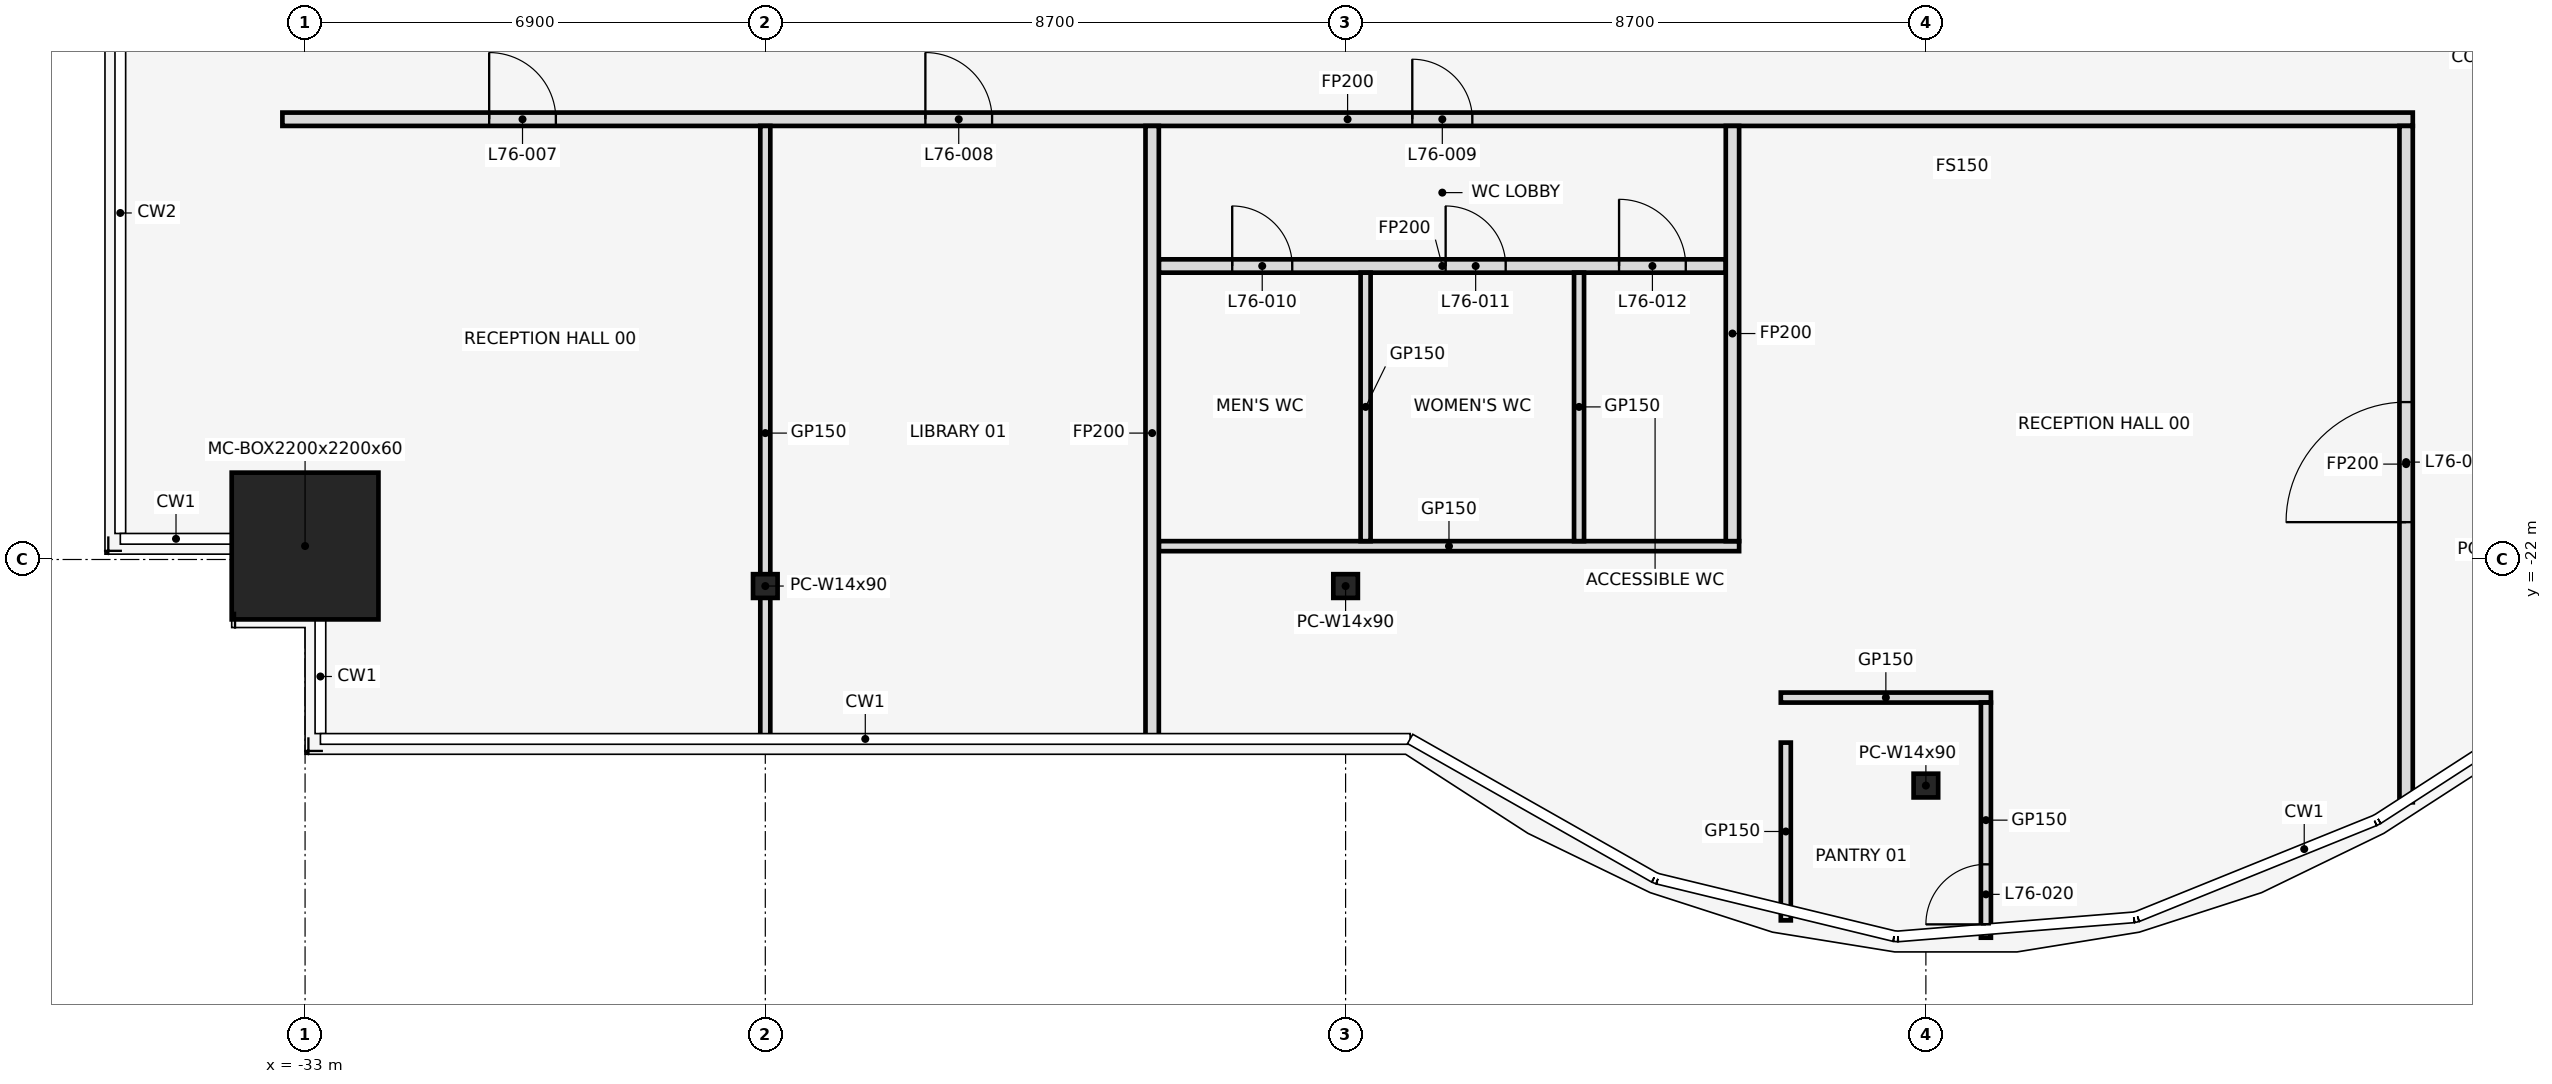
"""IFC4 building model, lengths in metres.
Left out: names, types, materials, properties, quantities, classifications, styles, units other than length and angle.
Written with IfcOpenShell. Run it as: python <this file> out.ifc"""

import sys

from ifc_helpers import new_model, si_unit, direction, frame, frame_2d, origin, origin_2d, place, context, subcontext, project, spatial, rectangle, hollow_rectangle, i_section, extrude, element, fill, save


model = new_model("IFC4")
c1 = context("Model", 3, precision=1e-05, world=origin(), true_north=direction((0.0, 1.0)))
c2 = subcontext(c1, "Body", "Model", "MODEL_VIEW")
j1 = project(units=[si_unit("LENGTHUNIT", "METRE"), si_unit("PLANEANGLEUNIT", "RADIAN")], contexts=[c1])
p1 = place(None, origin())
s1 = spatial("IfcSite", under=j1, at=p1, CompositionType="ELEMENT")
p2 = place(p1, origin())
s2 = spatial("IfcBuilding", under=s1, at=p2, CompositionType="ELEMENT")
p3 = place(p2, frame((0.0, 0.0, 338.0)))
s3 = spatial("IfcBuildingStorey", under=s2, at=p3, CompositionType="ELEMENT", Elevation=338.0)
p4 = place(p3, frame((-33.0, -21.798, 0.0), z_axis=(0.0, 0.0, 1.0), x_axis=(1.0, 0.0, 0.0)))
e1 = element("IfcColumn", 1, at=p4, inside=s3, PredefinedType="COLUMN", context=c2, shape_type="SweptSolid", body=[
    extrude(hollow_rectangle(XDim=2.2, YDim=2.2, WallThickness=0.06, at=origin_2d()), origin(), (0.0, 0.0, 1.0), 4.5),
])
for number, where, z_axis, x_axis in (
    (2, (-26.1, -22.398, 0.0), (0.0, 0.0, 1.0), (1.0, 0.0, 0.0)),
    (3, (-17.4, -22.398, 0.0), (0.0, 0.0, 1.0), (1.0, 0.0, 0.0)),
    (4, (-8.7, -25.389, 0.0), (0.0, 0.0, 1.0), (1.0, 0.0, 0.0)),
):
    element("IfcColumn", number, at=place(p3, frame(where, z_axis=z_axis, x_axis=x_axis)), inside=s3, PredefinedType="COLUMN", context=c2, shape_type="SweptSolid", body=[
        extrude(i_section(OverallWidth=0.368, OverallDepth=0.356, WebThickness=0.011, FlangeThickness=0.018, at=origin_2d()), origin(), (0.0, 0.0, 1.0), 4.5),
    ])
p5 = place(p3, frame((-10.875, -24.07, 0.0), z_axis=(0.0, 0.0, 1.0), x_axis=(1.0, 0.0, 0.0)))
e5 = element("IfcWall", 5, at=p5, inside=s3, PredefinedType="PARTITIONING", context=c2, shape_type="SweptSolid", body=[
    extrude(rectangle(XDim=3.15, YDim=0.15, at=frame_2d((1.575, 0.0))), origin(), (0.0, 0.0, 1.0), 3.368),
])
p6 = place(p3, frame((-20.2, -21.8, 0.0), z_axis=(0.0, 0.0, 1.0), x_axis=(1.0, 0.0, 0.0)))
e6 = element("IfcWall", 6, at=p6, inside=s3, PredefinedType="PARTITIONING", context=c2, shape_type="SweptSolid", body=[
    extrude(rectangle(XDim=8.7, YDim=0.15, at=frame_2d((4.35, 0.0))), origin(), (0.0, 0.0, 1.0), 3.368),
])
p7 = place(p3, frame((-20.2, -17.6, 0.0), z_axis=(0.0, 0.0, 1.0), x_axis=(1.0, 0.0, 0.0)))
e7 = element("IfcWall", 7, at=p7, inside=s3, PredefinedType="PARTITIONING", context=c2, shape_type="SweptSolid", body=[
    extrude(rectangle(XDim=8.5, YDim=0.2, at=frame_2d((4.25, 0.0))), origin(), (0.0, 0.0, 1.0), 3.368),
])
p8 = place(p7, frame((1.1, 0.0, 0.0)))
e8 = element("IfcOpeningElement", 8, at=p8, cuts=e7, PredefinedType="OPENING", context=c2, shape_type="SweptSolid", body=[
    extrude(rectangle(XDim=0.9, YDim=2.1, at=frame_2d((0.45, 1.05))), frame((0.0, 0.112, 0.0), z_axis=(0.0, -1.0, 0.0), x_axis=(1.0, 0.0, 0.0)), (0.0, 0.0, 1.0), 0.224),
])
p9 = place(p7, frame((4.3, 0.0, 0.0)))
e9 = element("IfcOpeningElement", 9, at=p9, cuts=e7, PredefinedType="OPENING", context=c2, shape_type="SweptSolid", body=[
    extrude(rectangle(XDim=0.9, YDim=2.1, at=frame_2d((0.45, 1.05))), frame((0.0, 0.112, 0.0), z_axis=(0.0, -1.0, 0.0), x_axis=(1.0, 0.0, 0.0)), (0.0, 0.0, 1.0), 0.224),
])
p10 = place(p7, frame((6.9, 0.0, 0.0)))
e10 = element("IfcOpeningElement", 10, at=p10, cuts=e7, PredefinedType="OPENING", context=c2, shape_type="SweptSolid", body=[
    extrude(rectangle(XDim=1.0, YDim=2.1, at=frame_2d((0.5, 1.05))), frame((0.0, 0.112, 0.0), z_axis=(0.0, -1.0, 0.0), x_axis=(1.0, 0.0, 0.0)), (0.0, 0.0, 1.0), 0.224),
])
p11 = place(p3, frame((-33.34, -15.4, 0.0), z_axis=(0.0, 0.0, 1.0), x_axis=(1.0, 0.0, 0.0)))
e11 = element("IfcWall", 11, at=p11, inside=s3, PredefinedType="PARTITIONING", context=c2, shape_type="SweptSolid", body=[
    extrude(rectangle(XDim=31.94, YDim=0.2, at=frame_2d((15.97, 0.0))), origin(), (0.0, 0.0, 1.0), 3.368),
])
p12 = place(p11, frame((3.1, 0.0, 0.0)))
e12 = element("IfcOpeningElement", 12, at=p12, cuts=e11, PredefinedType="OPENING", context=c2, shape_type="SweptSolid", body=[
    extrude(rectangle(XDim=1.0, YDim=2.1, at=frame_2d((0.5, 1.05))), frame((0.0, 0.112, 0.0), z_axis=(0.0, -1.0, 0.0), x_axis=(1.0, 0.0, 0.0)), (0.0, 0.0, 1.0), 0.224),
])
p13 = place(p11, frame((9.64, 0.0, 0.0)))
e13 = element("IfcOpeningElement", 13, at=p13, cuts=e11, PredefinedType="OPENING", context=c2, shape_type="SweptSolid", body=[
    extrude(rectangle(XDim=1.0, YDim=2.1, at=frame_2d((0.5, 1.05))), frame((0.0, 0.112, 0.0), z_axis=(0.0, -1.0, 0.0), x_axis=(1.0, 0.0, 0.0)), (0.0, 0.0, 1.0), 0.224),
])
p14 = place(p11, frame((16.94, 0.0, 0.0)))
e14 = element("IfcOpeningElement", 14, at=p14, cuts=e11, PredefinedType="OPENING", context=c2, shape_type="SweptSolid", body=[
    extrude(rectangle(XDim=0.9, YDim=2.1, at=frame_2d((0.45, 1.05))), frame((0.0, 0.112, 0.0), z_axis=(0.0, -1.0, 0.0), x_axis=(1.0, 0.0, 0.0)), (0.0, 0.0, 1.0), 0.224),
])
p15 = place(p3, frame((-26.1, -24.71, 0.0), z_axis=(0.0, 0.0, 1.0), x_axis=(0.0, 1.0, 0.0)))
e15 = element("IfcWall", 15, at=p15, inside=s3, PredefinedType="PARTITIONING", context=c2, shape_type="SweptSolid", body=[
    extrude(rectangle(XDim=9.21, YDim=0.15, at=frame_2d((4.605, 0.0))), origin(), (0.0, 0.0, 1.0), 3.368),
])
p16 = place(p3, frame((-20.3, -24.71, 0.0), z_axis=(0.0, 0.0, 1.0), x_axis=(0.0, 1.0, 0.0)))
e16 = element("IfcWall", 16, at=p16, inside=s3, PredefinedType="PARTITIONING", context=c2, shape_type="SweptSolid", body=[
    extrude(rectangle(XDim=9.21, YDim=0.2, at=frame_2d((4.605, 0.0))), origin(), (0.0, 0.0, 1.0), 3.368),
])
for number, where, z_axis, x_axis in (
    (17, (-17.1, -21.725, 0.0), (0.0, 0.0, 1.0), (0.0, 1.0, 0.0)),
    (18, (-13.9, -21.725, 0.0), (0.0, 0.0, 1.0), (0.0, 1.0, 0.0)),
):
    element("IfcWall", number, at=place(p3, frame(where, z_axis=z_axis, x_axis=x_axis)), inside=s3, PredefinedType="PARTITIONING", context=c2, shape_type="SweptSolid", body=[
        extrude(rectangle(XDim=4.025, YDim=0.15, at=frame_2d((2.013, 0.0))), origin(), (0.0, 0.0, 1.0), 3.368),
    ])
p17 = place(p3, frame((-11.6, -21.725, 0.0), z_axis=(0.0, 0.0, 1.0), x_axis=(0.0, 1.0, 0.0)))
e19 = element("IfcWall", 19, at=p17, inside=s3, PredefinedType="PARTITIONING", context=c2, shape_type="SweptSolid", body=[
    extrude(rectangle(XDim=6.225, YDim=0.2, at=frame_2d((3.113, 0.0))), origin(), (0.0, 0.0, 1.0), 3.368),
])
p18 = place(p3, frame((-10.8, -27.41, 0.0), z_axis=(0.0, 0.0, 1.0), x_axis=(0.0, 1.0, 0.0)))
e20 = element("IfcWall", 20, at=p18, inside=s3, PredefinedType="PARTITIONING", context=c2, shape_type="SweptSolid", body=[
    extrude(rectangle(XDim=2.665, YDim=0.15, at=frame_2d((1.333, 0.0))), origin(), (0.0, 0.0, 1.0), 3.368),
])
p19 = place(p3, frame((-7.8, -27.67, 0.0), z_axis=(0.0, 0.0, 1.0), x_axis=(0.0, 1.0, 0.0)))
e21 = element("IfcWall", 21, at=p19, inside=s3, PredefinedType="PARTITIONING", context=c2, shape_type="SweptSolid", body=[
    extrude(rectangle(XDim=3.525, YDim=0.15, at=frame_2d((1.762, 0.0))), origin(), (0.0, 0.0, 1.0), 3.368),
])
p20 = place(p19, frame((0.2, 0.0, 0.0)))
e22 = element("IfcOpeningElement", 22, at=p20, cuts=e21, PredefinedType="OPENING", context=c2, shape_type="SweptSolid", body=[
    extrude(rectangle(XDim=0.9, YDim=2.1, at=frame_2d((0.45, 1.05))), frame((0.0, 0.087, 0.0), z_axis=(0.0, -1.0, 0.0), x_axis=(1.0, 0.0, 0.0)), (0.0, 0.0, 1.0), 0.174),
])
p21 = place(p3, frame((-1.5, -25.64, 0.0), z_axis=(0.0, 0.0, 1.0), x_axis=(0.0, 1.0, 0.0)))
e23 = element("IfcWall", 23, at=p21, inside=s3, PredefinedType="PARTITIONING", context=c2, shape_type="SweptSolid", body=[
    extrude(rectangle(XDim=10.14, YDim=0.2, at=frame_2d((5.07, 0.0))), origin(), (0.0, 0.0, 1.0), 3.368),
])
p22 = place(p21, frame((4.2, 0.0, 0.0)))
e24 = element("IfcOpeningElement", 24, at=p22, cuts=e23, PredefinedType="OPENING", context=c2, shape_type="SweptSolid", body=[
    extrude(rectangle(XDim=1.8, YDim=2.1, at=frame_2d((0.9, 1.05))), frame((0.0, 0.112, 0.0), z_axis=(0.0, -1.0, 0.0), x_axis=(1.0, 0.0, 0.0)), (0.0, 0.0, 1.0), 0.224),
])
p23 = place(p12, frame((1.0, 0.0, 0.0), z_axis=(0.0, 0.0, 1.0), x_axis=(-1.0, 0.0, 0.0)))
e25 = element("IfcDoor", 25, at=p23, inside=s3, OperationType="SINGLE_SWING_LEFT", PredefinedType="DOOR", context=c2, shape_type="SweptSolid", body=[
    extrude(rectangle(XDim=1.0, YDim=2.1, at=frame_2d((0.5, 1.05))), frame((0.0, 0.025, 0.0), z_axis=(0.0, -1.0, 0.0), x_axis=(1.0, 0.0, 0.0)), (0.0, 0.0, 1.0), 0.05),
])
fill(e12, e25)
p24 = place(p13, frame((1.0, 0.0, 0.0), z_axis=(0.0, 0.0, 1.0), x_axis=(-1.0, 0.0, 0.0)))
e26 = element("IfcDoor", 26, at=p24, inside=s3, OperationType="SINGLE_SWING_RIGHT", PredefinedType="DOOR", context=c2, shape_type="SweptSolid", body=[
    extrude(rectangle(XDim=1.0, YDim=2.1, at=frame_2d((0.5, 1.05))), frame((0.0, 0.025, 0.0), z_axis=(0.0, -1.0, 0.0), x_axis=(1.0, 0.0, 0.0)), (0.0, 0.0, 1.0), 0.05),
])
fill(e13, e26)
p25 = place(p14, frame((0.9, 0.0, 0.0), z_axis=(0.0, 0.0, 1.0), x_axis=(-1.0, 0.0, 0.0)))
e27 = element("IfcDoor", 27, at=p25, inside=s3, OperationType="SINGLE_SWING_RIGHT", PredefinedType="DOOR", context=c2, shape_type="SweptSolid", body=[
    extrude(rectangle(XDim=0.9, YDim=2.1, at=frame_2d((0.45, 1.05))), frame((0.0, 0.025, 0.0), z_axis=(0.0, -1.0, 0.0), x_axis=(1.0, 0.0, 0.0)), (0.0, 0.0, 1.0), 0.05),
])
fill(e14, e27)
p26 = place(p8, frame((0.9, 0.0, 0.0), z_axis=(0.0, 0.0, 1.0), x_axis=(-1.0, 0.0, 0.0)))
e28 = element("IfcDoor", 28, at=p26, inside=s3, OperationType="SINGLE_SWING_LEFT", PredefinedType="DOOR", context=c2, shape_type="SweptSolid", body=[
    extrude(rectangle(XDim=0.9, YDim=2.1, at=frame_2d((0.45, 1.05))), frame((0.0, 0.025, 0.0), z_axis=(0.0, -1.0, 0.0), x_axis=(1.0, 0.0, 0.0)), (0.0, 0.0, 1.0), 0.05),
])
fill(e8, e28)
p27 = place(p9, frame((0.9, 0.0, 0.0), z_axis=(0.0, 0.0, 1.0), x_axis=(-1.0, 0.0, 0.0)))
e29 = element("IfcDoor", 29, at=p27, inside=s3, OperationType="SINGLE_SWING_RIGHT", PredefinedType="DOOR", context=c2, shape_type="SweptSolid", body=[
    extrude(rectangle(XDim=0.9, YDim=2.1, at=frame_2d((0.45, 1.05))), frame((0.0, 0.025, 0.0), z_axis=(0.0, -1.0, 0.0), x_axis=(1.0, 0.0, 0.0)), (0.0, 0.0, 1.0), 0.05),
])
fill(e9, e29)
p28 = place(p10, frame((1.0, 0.0, 0.0), z_axis=(0.0, 0.0, 1.0), x_axis=(-1.0, 0.0, 0.0)))
e30 = element("IfcDoor", 30, at=p28, inside=s3, OperationType="SINGLE_SWING_RIGHT", PredefinedType="DOOR", context=c2, shape_type="SweptSolid", body=[
    extrude(rectangle(XDim=1.0, YDim=2.1, at=frame_2d((0.5, 1.05))), frame((0.0, 0.025, 0.0), z_axis=(0.0, -1.0, 0.0), x_axis=(1.0, 0.0, 0.0)), (0.0, 0.0, 1.0), 0.05),
])
fill(e10, e30)
p29 = place(p22, origin())
e31 = element("IfcDoor", 31, at=p29, inside=s3, OperationType="SINGLE_SWING_LEFT", PredefinedType="DOOR", context=c2, shape_type="SweptSolid", body=[
    extrude(rectangle(XDim=1.8, YDim=2.1, at=frame_2d((0.9, 1.05))), frame((0.0, 0.025, 0.0), z_axis=(0.0, -1.0, 0.0), x_axis=(1.0, 0.0, 0.0)), (0.0, 0.0, 1.0), 0.05),
])
fill(e24, e31)
p30 = place(p20, origin())
e32 = element("IfcDoor", 32, at=p30, inside=s3, OperationType="SINGLE_SWING_LEFT", PredefinedType="DOOR", context=c2, shape_type="SweptSolid", body=[
    extrude(rectangle(XDim=0.9, YDim=2.1, at=frame_2d((0.45, 1.05))), frame((0.0, 0.025, 0.0), z_axis=(0.0, -1.0, 0.0), x_axis=(1.0, 0.0, 0.0)), (0.0, 0.0, 1.0), 0.05),
])
fill(e22, e32)
save(model, sys.argv[1])
